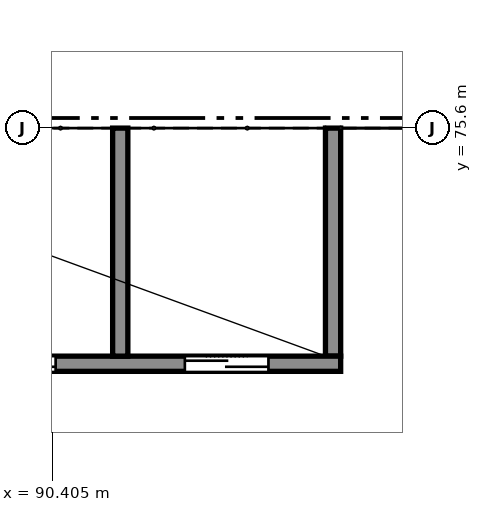
"""IFC4 building model, lengths in metres.
Left out: names, types, materials, properties, quantities, classifications, styles, units other than length and angle.
Written with IfcOpenShell. Run it as: python <this file> out.ifc"""

import sys

from ifc_helpers import new_model, si_unit, direction, frame, frame_2d, origin, place, context, subcontext, project, spatial, rectangle, extrude, element, fill, save


model = new_model("IFC4")
c1 = context("Model", 3, precision=1e-05, world=origin(), true_north=direction((0.0, 1.0)))
c2 = subcontext(c1, "Body", "Model", "MODEL_VIEW")
j1 = project(units=[si_unit("LENGTHUNIT", "METRE"), si_unit("PLANEANGLEUNIT", "RADIAN")], contexts=[c1])
p1 = place(None, origin())
s1 = spatial("IfcSite", under=j1, at=p1, CompositionType="ELEMENT")
p2 = place(p1, origin())
s2 = spatial("IfcBuilding", under=s1, at=p2, CompositionType="ELEMENT")
p3 = place(p2, frame((0.0, 0.0, 10.5)))
s3 = spatial("IfcBuildingStorey", under=s2, at=p3, CompositionType="ELEMENT", Elevation=10.5)
p4 = place(p3, frame((85.6, 72.5, 0.0), z_axis=(0.0, 0.0, 1.0), x_axis=(1.0, 0.0, 0.0)))
e1 = element("IfcWall", 1, at=p4, inside=s3, PredefinedType="SHEAR", context=c2, shape_type="SweptSolid", body=[
    extrude(rectangle(XDim=8.6, YDim=0.2, at=frame_2d((4.3, 0.0))), origin(), (0.0, 0.0, 1.0), 9.5),
])
p5 = place(p4, frame((0.95, 0.0, 0.0)))
e2 = element("IfcOpeningElement", 2, at=p5, cuts=e1, PredefinedType="OPENING", context=c2, shape_type="SweptSolid", body=[
    extrude(rectangle(XDim=1.1, YDim=2.1, at=frame_2d((0.55, 1.05))), frame((0.0, 0.11, 0.0), z_axis=(0.0, -1.0, 0.0), x_axis=(1.0, 0.0, 0.0)), (0.0, 0.0, 1.0), 0.22),
])
p6 = place(p4, frame((3.75, 0.0, 0.0)))
e3 = element("IfcOpeningElement", 3, at=p6, cuts=e1, PredefinedType="OPENING", context=c2, shape_type="SweptSolid", body=[
    extrude(rectangle(XDim=1.1, YDim=2.1, at=frame_2d((0.55, 1.05))), frame((0.0, 0.11, 0.0), z_axis=(0.0, -1.0, 0.0), x_axis=(1.0, 0.0, 0.0)), (0.0, 0.0, 1.0), 0.22),
])
p7 = place(p4, frame((6.55, 0.0, 0.0)))
e4 = element("IfcOpeningElement", 4, at=p7, cuts=e1, PredefinedType="OPENING", context=c2, shape_type="SweptSolid", body=[
    extrude(rectangle(XDim=1.1, YDim=2.1, at=frame_2d((0.55, 1.05))), frame((0.0, 0.11, 0.0), z_axis=(0.0, -1.0, 0.0), x_axis=(1.0, 0.0, 0.0)), (0.0, 0.0, 1.0), 0.22),
])
for number, where, z_axis, x_axis in (
    (5, (94.1, 72.6, 0.0), (0.0, 0.0, 1.0), (0.0, 1.0, 0.0)),
    (6, (91.3, 72.6, 0.0), (0.0, 0.0, 1.0), (0.0, 1.0, 0.0)),
):
    element("IfcWall", number, at=place(p3, frame(where, z_axis=z_axis, x_axis=x_axis)), inside=s3, PredefinedType="SHEAR", context=c2, shape_type="SweptSolid", body=[
        extrude(rectangle(XDim=3.0, YDim=0.2, at=frame_2d((1.5, 0.0))), origin(), (0.0, 0.0, 1.0), 9.5),
    ])
p8 = place(p6, origin())
e7 = element("IfcDoor", 7, at=p8, inside=s3, OperationType="DOUBLE_DOOR_SLIDING", PredefinedType="DOOR", context=c2, shape_type="SweptSolid", body=[
    extrude(rectangle(XDim=1.1, YDim=2.1, at=frame_2d((0.55, 1.05))), frame((0.0, 0.025, 0.0), z_axis=(0.0, -1.0, 0.0), x_axis=(1.0, 0.0, 0.0)), (0.0, 0.0, 1.0), 0.05),
])
fill(e3, e7)
p9 = place(p7, origin())
e8 = element("IfcDoor", 8, at=p9, inside=s3, OperationType="DOUBLE_DOOR_SLIDING", PredefinedType="DOOR", context=c2, shape_type="SweptSolid", body=[
    extrude(rectangle(XDim=1.1, YDim=2.1, at=frame_2d((0.55, 1.05))), frame((0.0, 0.025, 0.0), z_axis=(0.0, -1.0, 0.0), x_axis=(1.0, 0.0, 0.0)), (0.0, 0.0, 1.0), 0.05),
])
fill(e4, e8)
save(model, sys.argv[1])
